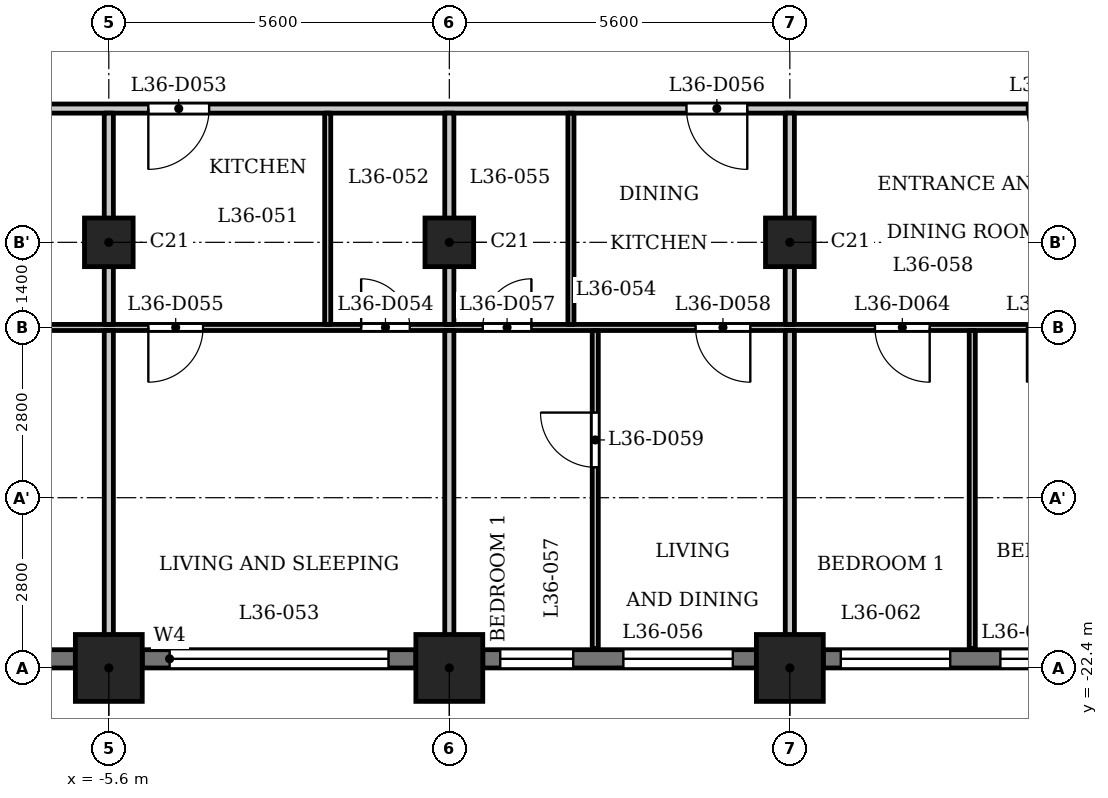
"""IFC4 building model, lengths in metres.
Left out: names, types, materials, properties, quantities, classifications, styles, units other than length and angle.
Written with IfcOpenShell. Run it as: python <this file> out.ifc"""

import sys

from ifc_helpers import new_model, si_unit, direction, frame, frame_2d, origin, origin_2d, place, context, subcontext, project, spatial, rectangle, extrude, element, fill, save


model = new_model("IFC4")
c1 = context("Model", 3, precision=1e-05, world=origin(), true_north=direction((0.0, 1.0)))
c2 = subcontext(c1, "Body", "Model", "MODEL_VIEW")
j1 = project(units=[si_unit("LENGTHUNIT", "METRE"), si_unit("PLANEANGLEUNIT", "RADIAN")], contexts=[c1])
p1 = place(None, origin())
s1 = spatial("IfcSite", under=j1, at=p1, CompositionType="ELEMENT")
p2 = place(p1, origin())
s2 = spatial("IfcBuilding", under=s1, at=p2, CompositionType="ELEMENT")
p3 = place(p2, frame((0.0, 0.0, 143.1)))
s3 = spatial("IfcBuildingStorey", under=s2, at=p3, CompositionType="ELEMENT", Elevation=143.1)
for number, where, z_axis, x_axis in (
    (1, (-5.6, -22.4, 0.0), (0.0, 0.0, 1.0), (1.0, 0.0, 0.0)),
    (2, (0.0, -22.4, 0.0), (0.0, 0.0, 1.0), (1.0, 0.0, 0.0)),
    (3, (5.6, -22.4, 0.0), (0.0, 0.0, 1.0), (1.0, 0.0, 0.0)),
):
    element("IfcColumn", number, at=place(p3, frame(where, z_axis=z_axis, x_axis=x_axis)), inside=s3, PredefinedType="COLUMN", context=c2, shape_type="SweptSolid", body=[
        extrude(rectangle(XDim=1.1, YDim=1.1, at=origin_2d()), origin(), (0.0, 0.0, 1.0), 3.5),
    ])
for number, where, z_axis, x_axis in (
    (4, (-5.6, -15.4, 0.0), (0.0, 0.0, 1.0), (1.0, 0.0, 0.0)),
    (5, (0.0, -15.4, 0.0), (0.0, 0.0, 1.0), (1.0, 0.0, 0.0)),
    (6, (5.6, -15.4, 0.0), (0.0, 0.0, 1.0), (1.0, 0.0, 0.0)),
):
    element("IfcColumn", number, at=place(p3, frame(where, z_axis=z_axis, x_axis=x_axis)), inside=s3, PredefinedType="COLUMN", context=c2, shape_type="SweptSolid", body=[
        extrude(rectangle(XDim=0.8, YDim=0.8, at=origin_2d()), origin(), (0.0, 0.0, 1.0), 3.5),
    ])
p4 = place(p3, frame((-10.65, -22.25, 0.0), z_axis=(0.0, 0.0, 1.0), x_axis=(1.0, 0.0, 0.0)))
e7 = element("IfcWall", 7, at=p4, inside=s3, PredefinedType="SOLIDWALL", context=c2, shape_type="SweptSolid", body=[
    extrude(rectangle(XDim=4.5, YDim=0.3, at=frame_2d((2.25, 0.0))), origin(), (0.0, 0.0, 1.0), 2.45),
])
p5 = place(p4, frame((0.45, 0.0, 1.2)))
e8 = element("IfcOpeningElement", 8, at=p5, cuts=e7, PredefinedType="OPENING", context=c2, shape_type="SweptSolid", body=[
    extrude(rectangle(XDim=3.6, YDim=0.95, at=frame_2d((1.8, 0.475))), frame((0.0, 0.16, 0.0), z_axis=(0.0, -1.0, 0.0), x_axis=(1.0, 0.0, 0.0)), (0.0, 0.0, 1.0), 0.32),
])
p6 = place(p3, frame((-5.05, -22.25, 0.0), z_axis=(0.0, 0.0, 1.0), x_axis=(1.0, 0.0, 0.0)))
e9 = element("IfcWall", 9, at=p6, inside=s3, PredefinedType="SOLIDWALL", context=c2, shape_type="SweptSolid", body=[
    extrude(rectangle(XDim=4.5, YDim=0.3, at=frame_2d((2.25, 0.0))), origin(), (0.0, 0.0, 1.0), 2.45),
])
p7 = place(p6, frame((0.45, 0.0, 1.2)))
e10 = element("IfcOpeningElement", 10, at=p7, cuts=e9, PredefinedType="OPENING", context=c2, shape_type="SweptSolid", body=[
    extrude(rectangle(XDim=3.6, YDim=0.95, at=frame_2d((1.8, 0.475))), frame((0.0, 0.16, 0.0), z_axis=(0.0, -1.0, 0.0), x_axis=(1.0, 0.0, 0.0)), (0.0, 0.0, 1.0), 0.32),
])
p8 = place(p3, frame((0.55, -22.25, 0.0), z_axis=(0.0, 0.0, 1.0), x_axis=(1.0, 0.0, 0.0)))
e11 = element("IfcWall", 11, at=p8, inside=s3, PredefinedType="SOLIDWALL", context=c2, shape_type="SweptSolid", body=[
    extrude(rectangle(XDim=4.5, YDim=0.3, at=frame_2d((2.25, 0.0))), origin(), (0.0, 0.0, 1.0), 2.45),
])
p9 = place(p8, frame((0.288, 0.0, 0.6)))
e12 = element("IfcOpeningElement", 12, at=p9, cuts=e11, PredefinedType="OPENING", context=c2, shape_type="SweptSolid", body=[
    extrude(rectangle(XDim=1.2, YDim=1.55, at=frame_2d((0.6, 0.775))), frame((0.0, 0.16, 0.0), z_axis=(0.0, -1.0, 0.0), x_axis=(1.0, 0.0, 0.0)), (0.0, 0.0, 1.0), 0.32),
])
p10 = place(p8, frame((2.312, 0.0, 0.9)))
e13 = element("IfcOpeningElement", 13, at=p10, cuts=e11, PredefinedType="OPENING", context=c2, shape_type="SweptSolid", body=[
    extrude(rectangle(XDim=1.8, YDim=1.25, at=frame_2d((0.9, 0.625))), frame((0.0, 0.16, 0.0), z_axis=(0.0, -1.0, 0.0), x_axis=(1.0, 0.0, 0.0)), (0.0, 0.0, 1.0), 0.32),
])
p11 = place(p3, frame((6.15, -22.25, 0.0), z_axis=(0.0, 0.0, 1.0), x_axis=(1.0, 0.0, 0.0)))
e14 = element("IfcWall", 14, at=p11, inside=s3, PredefinedType="SOLIDWALL", context=c2, shape_type="SweptSolid", body=[
    extrude(rectangle(XDim=4.5, YDim=0.3, at=frame_2d((2.25, 0.0))), origin(), (0.0, 0.0, 1.0), 2.45),
])
p12 = place(p11, frame((0.288, 0.0, 0.9)))
e15 = element("IfcOpeningElement", 15, at=p12, cuts=e14, PredefinedType="OPENING", context=c2, shape_type="SweptSolid", body=[
    extrude(rectangle(XDim=1.8, YDim=1.25, at=frame_2d((0.9, 0.625))), frame((0.0, 0.16, 0.0), z_axis=(0.0, -1.0, 0.0), x_axis=(1.0, 0.0, 0.0)), (0.0, 0.0, 1.0), 0.32),
])
p13 = place(p11, frame((2.913, 0.0, 0.6)))
e16 = element("IfcOpeningElement", 16, at=p13, cuts=e14, PredefinedType="OPENING", context=c2, shape_type="SweptSolid", body=[
    extrude(rectangle(XDim=1.2, YDim=1.55, at=frame_2d((0.6, 0.775))), frame((0.0, 0.16, 0.0), z_axis=(0.0, -1.0, 0.0), x_axis=(1.0, 0.0, 0.0)), (0.0, 0.0, 1.0), 0.32),
])
p14 = place(p3, frame((-16.725, -16.8, 0.0), z_axis=(0.0, 0.0, 1.0), x_axis=(1.0, 0.0, 0.0)))
e17 = element("IfcWall", 17, at=p14, inside=s3, PredefinedType="PARTITIONING", context=c2, shape_type="SweptSolid", body=[
    extrude(rectangle(XDim=33.45, YDim=0.1, at=frame_2d((16.725, 0.0))), origin(), (0.0, 0.0, 1.0), 3.2),
])
p15 = place(p14, frame((0.575, 0.0, 0.0)))
e18 = element("IfcOpeningElement", 18, at=p15, cuts=e17, PredefinedType="OPENING", context=c2, shape_type="SweptSolid", body=[
    extrude(rectangle(XDim=0.8, YDim=2.1, at=frame_2d((0.4, 1.05))), frame((0.0, 0.06, 0.0), z_axis=(0.0, -1.0, 0.0), x_axis=(1.0, 0.0, 0.0)), (0.0, 0.0, 1.0), 0.12),
])
p16 = place(p14, frame((6.175, 0.0, 0.0)))
e19 = element("IfcOpeningElement", 19, at=p16, cuts=e17, PredefinedType="OPENING", context=c2, shape_type="SweptSolid", body=[
    extrude(rectangle(XDim=0.9, YDim=2.1, at=frame_2d((0.45, 1.05))), frame((0.0, 0.06, 0.0), z_axis=(0.0, -1.0, 0.0), x_axis=(1.0, 0.0, 0.0)), (0.0, 0.0, 1.0), 0.12),
])
p17 = place(p14, frame((15.275, 0.0, 0.0)))
e20 = element("IfcOpeningElement", 20, at=p17, cuts=e17, PredefinedType="OPENING", context=c2, shape_type="SweptSolid", body=[
    extrude(rectangle(XDim=0.8, YDim=2.1, at=frame_2d((0.4, 1.05))), frame((0.0, 0.06, 0.0), z_axis=(0.0, -1.0, 0.0), x_axis=(1.0, 0.0, 0.0)), (0.0, 0.0, 1.0), 0.12),
])
p18 = place(p14, frame((11.775, 0.0, 0.0)))
e21 = element("IfcOpeningElement", 21, at=p18, cuts=e17, PredefinedType="OPENING", context=c2, shape_type="SweptSolid", body=[
    extrude(rectangle(XDim=0.9, YDim=2.1, at=frame_2d((0.45, 1.05))), frame((0.0, 0.06, 0.0), z_axis=(0.0, -1.0, 0.0), x_axis=(1.0, 0.0, 0.0)), (0.0, 0.0, 1.0), 0.12),
])
p19 = place(p14, frame((17.275, 0.0, 0.0)))
e22 = element("IfcOpeningElement", 22, at=p19, cuts=e17, PredefinedType="OPENING", context=c2, shape_type="SweptSolid", body=[
    extrude(rectangle(XDim=0.8, YDim=2.1, at=frame_2d((0.4, 1.05))), frame((0.0, 0.06, 0.0), z_axis=(0.0, -1.0, 0.0), x_axis=(1.0, 0.0, 0.0)), (0.0, 0.0, 1.0), 0.12),
])
p20 = place(p14, frame((20.775, 0.0, 0.0)))
e23 = element("IfcOpeningElement", 23, at=p20, cuts=e17, PredefinedType="OPENING", context=c2, shape_type="SweptSolid", body=[
    extrude(rectangle(XDim=0.9, YDim=2.1, at=frame_2d((0.45, 1.05))), frame((0.0, 0.06, 0.0), z_axis=(0.0, -1.0, 0.0), x_axis=(1.0, 0.0, 0.0)), (0.0, 0.0, 1.0), 0.12),
])
p21 = place(p14, frame((31.575, 0.0, 0.0)))
e24 = element("IfcOpeningElement", 24, at=p21, cuts=e17, PredefinedType="OPENING", context=c2, shape_type="SweptSolid", body=[
    extrude(rectangle(XDim=0.8, YDim=2.1, at=frame_2d((0.4, 1.05))), frame((0.0, 0.06, 0.0), z_axis=(0.0, -1.0, 0.0), x_axis=(1.0, 0.0, 0.0)), (0.0, 0.0, 1.0), 0.12),
])
p22 = place(p14, frame((28.575, 0.0, 0.0)))
e25 = element("IfcOpeningElement", 25, at=p22, cuts=e17, PredefinedType="OPENING", context=c2, shape_type="SweptSolid", body=[
    extrude(rectangle(XDim=0.9, YDim=2.1, at=frame_2d((0.45, 1.05))), frame((0.0, 0.06, 0.0), z_axis=(0.0, -1.0, 0.0), x_axis=(1.0, 0.0, 0.0)), (0.0, 0.0, 1.0), 0.12),
])
p23 = place(p14, frame((23.725, 0.0, 0.0)))
e26 = element("IfcOpeningElement", 26, at=p23, cuts=e17, PredefinedType="OPENING", context=c2, shape_type="SweptSolid", body=[
    extrude(rectangle(XDim=0.9, YDim=2.1, at=frame_2d((0.45, 1.05))), frame((0.0, 0.06, 0.0), z_axis=(0.0, -1.0, 0.0), x_axis=(1.0, 0.0, 0.0)), (0.0, 0.0, 1.0), 0.12),
])
p24 = place(p14, frame((26.225, 0.0, 0.0)))
e27 = element("IfcOpeningElement", 27, at=p24, cuts=e17, PredefinedType="OPENING", context=c2, shape_type="SweptSolid", body=[
    extrude(rectangle(XDim=0.9, YDim=2.1, at=frame_2d((0.45, 1.05))), frame((0.0, 0.06, 0.0), z_axis=(0.0, -1.0, 0.0), x_axis=(1.0, 0.0, 0.0)), (0.0, 0.0, 1.0), 0.12),
])
p25 = place(p3, frame((-17.4, -13.2, 0.0), z_axis=(0.0, 0.0, 1.0), x_axis=(1.0, 0.0, 0.0)))
e28 = element("IfcWall", 28, at=p25, inside=s3, PredefinedType="PARTITIONING", context=c2, shape_type="SweptSolid", body=[
    extrude(rectangle(XDim=34.8, YDim=0.15, at=frame_2d((17.4, 0.0))), origin(), (0.0, 0.0, 1.0), 3.2),
])
p26 = place(p25, frame((0.15, 0.0, 0.0)))
e29 = element("IfcOpeningElement", 29, at=p26, cuts=e28, PredefinedType="OPENING", context=c2, shape_type="SweptSolid", body=[
    extrude(rectangle(XDim=1.0, YDim=2.1, at=frame_2d((0.5, 1.05))), frame((0.0, 0.085, 0.0), z_axis=(0.0, -1.0, 0.0), x_axis=(1.0, 0.0, 0.0)), (0.0, 0.0, 1.0), 0.17),
])
p27 = place(p25, frame((33.55, 0.0, 0.0)))
e30 = element("IfcOpeningElement", 30, at=p27, cuts=e28, PredefinedType="OPENING", context=c2, shape_type="SweptSolid", body=[
    extrude(rectangle(XDim=1.0, YDim=2.1, at=frame_2d((0.5, 1.05))), frame((0.0, 0.085, 0.0), z_axis=(0.0, -1.0, 0.0), x_axis=(1.0, 0.0, 0.0)), (0.0, 0.0, 1.0), 0.17),
])
p28 = place(p25, frame((6.85, 0.0, 0.0)))
e31 = element("IfcOpeningElement", 31, at=p28, cuts=e28, PredefinedType="OPENING", context=c2, shape_type="SweptSolid", body=[
    extrude(rectangle(XDim=1.0, YDim=2.1, at=frame_2d((0.5, 1.05))), frame((0.0, 0.085, 0.0), z_axis=(0.0, -1.0, 0.0), x_axis=(1.0, 0.0, 0.0)), (0.0, 0.0, 1.0), 0.17),
])
p29 = place(p25, frame((12.45, 0.0, 0.0)))
e32 = element("IfcOpeningElement", 32, at=p29, cuts=e28, PredefinedType="OPENING", context=c2, shape_type="SweptSolid", body=[
    extrude(rectangle(XDim=1.0, YDim=2.1, at=frame_2d((0.5, 1.05))), frame((0.0, 0.085, 0.0), z_axis=(0.0, -1.0, 0.0), x_axis=(1.0, 0.0, 0.0)), (0.0, 0.0, 1.0), 0.17),
])
p30 = place(p25, frame((21.3, 0.0, 0.0)))
e33 = element("IfcOpeningElement", 33, at=p30, cuts=e28, PredefinedType="OPENING", context=c2, shape_type="SweptSolid", body=[
    extrude(rectangle(XDim=1.0, YDim=2.1, at=frame_2d((0.5, 1.05))), frame((0.0, 0.085, 0.0), z_axis=(0.0, -1.0, 0.0), x_axis=(1.0, 0.0, 0.0)), (0.0, 0.0, 1.0), 0.17),
])
p31 = place(p25, frame((26.9, 0.0, 0.0)))
e34 = element("IfcOpeningElement", 34, at=p31, cuts=e28, PredefinedType="OPENING", context=c2, shape_type="SweptSolid", body=[
    extrude(rectangle(XDim=1.0, YDim=2.1, at=frame_2d((0.5, 1.05))), frame((0.0, 0.085, 0.0), z_axis=(0.0, -1.0, 0.0), x_axis=(1.0, 0.0, 0.0)), (0.0, 0.0, 1.0), 0.17),
])
p32 = place(p3, frame((-5.6, -22.93, 0.0), z_axis=(0.0, 0.0, 1.0), x_axis=(0.0, 1.0, 0.0)))
e35 = element("IfcWall", 35, at=p32, inside=s3, PredefinedType="PARTITIONING", context=c2, shape_type="SweptSolid", body=[
    extrude(rectangle(XDim=6.08, YDim=0.15, at=frame_2d((3.04, 0.0))), origin(), (0.0, 0.0, 1.0), 3.2),
])
p33 = place(p3, frame((-5.6, -16.75, 0.0), z_axis=(0.0, 0.0, 1.0), x_axis=(0.0, 1.0, 0.0)))
e36 = element("IfcWall", 36, at=p33, inside=s3, PredefinedType="PARTITIONING", context=c2, shape_type="SweptSolid", body=[
    extrude(rectangle(XDim=3.475, YDim=0.15, at=frame_2d((1.738, 0.0))), origin(), (0.0, 0.0, 1.0), 3.2),
])
p34 = place(p3, frame((-2.0, -16.75, 0.0), z_axis=(0.0, 0.0, 1.0), x_axis=(0.0, 1.0, 0.0)))
e37 = element("IfcWall", 37, at=p34, inside=s3, PredefinedType="PARTITIONING", context=c2, shape_type="SweptSolid", body=[
    extrude(rectangle(XDim=3.475, YDim=0.1, at=frame_2d((1.738, 0.0))), origin(), (0.0, 0.0, 1.0), 3.2),
])
p35 = place(p3, frame((0.0, -22.93, 0.0), z_axis=(0.0, 0.0, 1.0), x_axis=(0.0, 1.0, 0.0)))
e38 = element("IfcWall", 38, at=p35, inside=s3, PredefinedType="PARTITIONING", context=c2, shape_type="SweptSolid", body=[
    extrude(rectangle(XDim=6.08, YDim=0.15, at=frame_2d((3.04, 0.0))), origin(), (0.0, 0.0, 1.0), 3.2),
])
p36 = place(p3, frame((0.0, -16.75, 0.0), z_axis=(0.0, 0.0, 1.0), x_axis=(0.0, 1.0, 0.0)))
e39 = element("IfcWall", 39, at=p36, inside=s3, PredefinedType="PARTITIONING", context=c2, shape_type="SweptSolid", body=[
    extrude(rectangle(XDim=3.475, YDim=0.15, at=frame_2d((1.738, 0.0))), origin(), (0.0, 0.0, 1.0), 3.2),
])
p37 = place(p3, frame((2.0, -16.75, 0.0), z_axis=(0.0, 0.0, 1.0), x_axis=(0.0, 1.0, 0.0)))
e40 = element("IfcWall", 40, at=p37, inside=s3, PredefinedType="PARTITIONING", context=c2, shape_type="SweptSolid", body=[
    extrude(rectangle(XDim=3.475, YDim=0.1, at=frame_2d((1.738, 0.0))), origin(), (0.0, 0.0, 1.0), 3.2),
])
p38 = place(p3, frame((2.4, -22.08, 0.0), z_axis=(0.0, 0.0, 1.0), x_axis=(0.0, 1.0, 0.0)))
e41 = element("IfcWall", 41, at=p38, inside=s3, PredefinedType="PARTITIONING", context=c2, shape_type="SweptSolid", body=[
    extrude(rectangle(XDim=5.23, YDim=0.1, at=frame_2d((2.615, 0.0))), origin(), (0.0, 0.0, 1.0), 3.2),
])
p39 = place(p38, frame((2.98, 0.0, 0.0)))
e42 = element("IfcOpeningElement", 42, at=p39, cuts=e41, PredefinedType="OPENING", context=c2, shape_type="SweptSolid", body=[
    extrude(rectangle(XDim=0.9, YDim=2.1, at=frame_2d((0.45, 1.05))), frame((0.0, 0.06, 0.0), z_axis=(0.0, -1.0, 0.0), x_axis=(1.0, 0.0, 0.0)), (0.0, 0.0, 1.0), 0.12),
])
p40 = place(p3, frame((5.6, -22.93, 0.0), z_axis=(0.0, 0.0, 1.0), x_axis=(0.0, 1.0, 0.0)))
e43 = element("IfcWall", 43, at=p40, inside=s3, PredefinedType="PARTITIONING", context=c2, shape_type="SweptSolid", body=[
    extrude(rectangle(XDim=6.08, YDim=0.15, at=frame_2d((3.04, 0.0))), origin(), (0.0, 0.0, 1.0), 3.2),
])
p41 = place(p3, frame((5.6, -16.75, 0.0), z_axis=(0.0, 0.0, 1.0), x_axis=(0.0, 1.0, 0.0)))
e44 = element("IfcWall", 44, at=p41, inside=s3, PredefinedType="PARTITIONING", context=c2, shape_type="SweptSolid", body=[
    extrude(rectangle(XDim=3.475, YDim=0.15, at=frame_2d((1.738, 0.0))), origin(), (0.0, 0.0, 1.0), 3.2),
])
p42 = place(p3, frame((8.6, -22.08, 0.0), z_axis=(0.0, 0.0, 1.0), x_axis=(0.0, 1.0, 0.0)))
e45 = element("IfcWall", 45, at=p42, inside=s3, PredefinedType="PARTITIONING", context=c2, shape_type="SweptSolid", body=[
    extrude(rectangle(XDim=5.23, YDim=0.1, at=frame_2d((2.615, 0.0))), origin(), (0.0, 0.0, 1.0), 3.2),
])
p43 = place(p29, origin())
e46 = element("IfcDoor", 46, at=p43, inside=s3, OperationType="SINGLE_SWING_LEFT", PredefinedType="DOOR", context=c2, shape_type="SweptSolid", body=[
    extrude(rectangle(XDim=1.0, YDim=2.1, at=frame_2d((0.5, 1.05))), frame((0.0, 0.025, 0.0), z_axis=(0.0, -1.0, 0.0), x_axis=(1.0, 0.0, 0.0)), (0.0, 0.0, 1.0), 0.05),
])
fill(e32, e46)
p44 = place(p17, origin())
e47 = element("IfcDoor", 47, at=p44, inside=s3, OperationType="SINGLE_SWING_RIGHT", PredefinedType="DOOR", context=c2, shape_type="SweptSolid", body=[
    extrude(rectangle(XDim=0.8, YDim=2.1, at=frame_2d((0.4, 1.05))), frame((0.0, 0.025, 0.0), z_axis=(0.0, -1.0, 0.0), x_axis=(1.0, 0.0, 0.0)), (0.0, 0.0, 1.0), 0.05),
])
fill(e20, e47)
p45 = place(p18, origin())
e48 = element("IfcDoor", 48, at=p45, inside=s3, OperationType="SINGLE_SWING_LEFT", PredefinedType="DOOR", context=c2, shape_type="SweptSolid", body=[
    extrude(rectangle(XDim=0.9, YDim=2.1, at=frame_2d((0.45, 1.05))), frame((0.0, 0.025, 0.0), z_axis=(0.0, -1.0, 0.0), x_axis=(1.0, 0.0, 0.0)), (0.0, 0.0, 1.0), 0.05),
])
fill(e21, e48)
p46 = place(p30, origin())
e49 = element("IfcDoor", 49, at=p46, inside=s3, OperationType="SINGLE_SWING_RIGHT", PredefinedType="DOOR", context=c2, shape_type="SweptSolid", body=[
    extrude(rectangle(XDim=1.0, YDim=2.1, at=frame_2d((0.5, 1.05))), frame((0.0, 0.025, 0.0), z_axis=(0.0, -1.0, 0.0), x_axis=(1.0, 0.0, 0.0)), (0.0, 0.0, 1.0), 0.05),
])
fill(e33, e49)
p47 = place(p19, origin())
e50 = element("IfcDoor", 50, at=p47, inside=s3, OperationType="SINGLE_SWING_LEFT", PredefinedType="DOOR", context=c2, shape_type="SweptSolid", body=[
    extrude(rectangle(XDim=0.8, YDim=2.1, at=frame_2d((0.4, 1.05))), frame((0.0, 0.025, 0.0), z_axis=(0.0, -1.0, 0.0), x_axis=(1.0, 0.0, 0.0)), (0.0, 0.0, 1.0), 0.05),
])
fill(e22, e50)
p48 = place(p20, origin())
e51 = element("IfcDoor", 51, at=p48, inside=s3, OperationType="SINGLE_SWING_RIGHT", PredefinedType="DOOR", context=c2, shape_type="SweptSolid", body=[
    extrude(rectangle(XDim=0.9, YDim=2.1, at=frame_2d((0.45, 1.05))), frame((0.0, 0.025, 0.0), z_axis=(0.0, -1.0, 0.0), x_axis=(1.0, 0.0, 0.0)), (0.0, 0.0, 1.0), 0.05),
])
fill(e23, e51)
p49 = place(p39, origin())
e52 = element("IfcDoor", 52, at=p49, inside=s3, OperationType="SINGLE_SWING_LEFT", PredefinedType="DOOR", context=c2, shape_type="SweptSolid", body=[
    extrude(rectangle(XDim=0.9, YDim=2.1, at=frame_2d((0.45, 1.05))), frame((0.0, 0.025, 0.0), z_axis=(0.0, -1.0, 0.0), x_axis=(1.0, 0.0, 0.0)), (0.0, 0.0, 1.0), 0.05),
])
fill(e42, e52)
p50 = place(p31, origin())
e53 = element("IfcDoor", 53, at=p50, inside=s3, OperationType="SINGLE_SWING_RIGHT", PredefinedType="DOOR", context=c2, shape_type="SweptSolid", body=[
    extrude(rectangle(XDim=1.0, YDim=2.1, at=frame_2d((0.5, 1.05))), frame((0.0, 0.025, 0.0), z_axis=(0.0, -1.0, 0.0), x_axis=(1.0, 0.0, 0.0)), (0.0, 0.0, 1.0), 0.05),
])
fill(e34, e53)
p51 = place(p23, origin())
e54 = element("IfcDoor", 54, at=p51, inside=s3, OperationType="SINGLE_SWING_RIGHT", PredefinedType="DOOR", context=c2, shape_type="SweptSolid", body=[
    extrude(rectangle(XDim=0.9, YDim=2.1, at=frame_2d((0.45, 1.05))), frame((0.0, 0.025, 0.0), z_axis=(0.0, -1.0, 0.0), x_axis=(1.0, 0.0, 0.0)), (0.0, 0.0, 1.0), 0.05),
])
fill(e26, e54)
p52 = place(p24, origin())
e55 = element("IfcDoor", 55, at=p52, inside=s3, OperationType="SINGLE_SWING_LEFT", PredefinedType="DOOR", context=c2, shape_type="SweptSolid", body=[
    extrude(rectangle(XDim=0.9, YDim=2.1, at=frame_2d((0.45, 1.05))), frame((0.0, 0.025, 0.0), z_axis=(0.0, -1.0, 0.0), x_axis=(1.0, 0.0, 0.0)), (0.0, 0.0, 1.0), 0.05),
])
fill(e27, e55)
p53 = place(p7, origin())
e56 = element("IfcWindow", 56, at=p53, inside=s3, PartitioningType="SINGLE_PANEL", PredefinedType="WINDOW", context=c2, shape_type="SweptSolid", body=[
    extrude(rectangle(XDim=3.6, YDim=0.95, at=frame_2d((1.8, 0.475))), frame((0.0, 0.03, 0.0), z_axis=(0.0, -1.0, 0.0), x_axis=(1.0, 0.0, 0.0)), (0.0, 0.0, 1.0), 0.06),
])
fill(e10, e56)
p54 = place(p9, origin())
e57 = element("IfcWindow", 57, at=p54, inside=s3, PartitioningType="SINGLE_PANEL", PredefinedType="WINDOW", context=c2, shape_type="SweptSolid", body=[
    extrude(rectangle(XDim=1.2, YDim=1.55, at=frame_2d((0.6, 0.775))), frame((0.0, 0.03, 0.0), z_axis=(0.0, -1.0, 0.0), x_axis=(1.0, 0.0, 0.0)), (0.0, 0.0, 1.0), 0.06),
])
fill(e12, e57)
p55 = place(p10, origin())
e58 = element("IfcWindow", 58, at=p55, inside=s3, PartitioningType="SINGLE_PANEL", PredefinedType="WINDOW", context=c2, shape_type="SweptSolid", body=[
    extrude(rectangle(XDim=1.8, YDim=1.25, at=frame_2d((0.9, 0.625))), frame((0.0, 0.03, 0.0), z_axis=(0.0, -1.0, 0.0), x_axis=(1.0, 0.0, 0.0)), (0.0, 0.0, 1.0), 0.06),
])
fill(e13, e58)
p56 = place(p12, origin())
e59 = element("IfcWindow", 59, at=p56, inside=s3, PartitioningType="SINGLE_PANEL", PredefinedType="WINDOW", context=c2, shape_type="SweptSolid", body=[
    extrude(rectangle(XDim=1.8, YDim=1.25, at=frame_2d((0.9, 0.625))), frame((0.0, 0.03, 0.0), z_axis=(0.0, -1.0, 0.0), x_axis=(1.0, 0.0, 0.0)), (0.0, 0.0, 1.0), 0.06),
])
fill(e15, e59)
p57 = place(p13, origin())
e60 = element("IfcWindow", 60, at=p57, inside=s3, PartitioningType="SINGLE_PANEL", PredefinedType="WINDOW", context=c2, shape_type="SweptSolid", body=[
    extrude(rectangle(XDim=1.2, YDim=1.55, at=frame_2d((0.6, 0.775))), frame((0.0, 0.03, 0.0), z_axis=(0.0, -1.0, 0.0), x_axis=(1.0, 0.0, 0.0)), (0.0, 0.0, 1.0), 0.06),
])
fill(e16, e60)
save(model, sys.argv[1])
